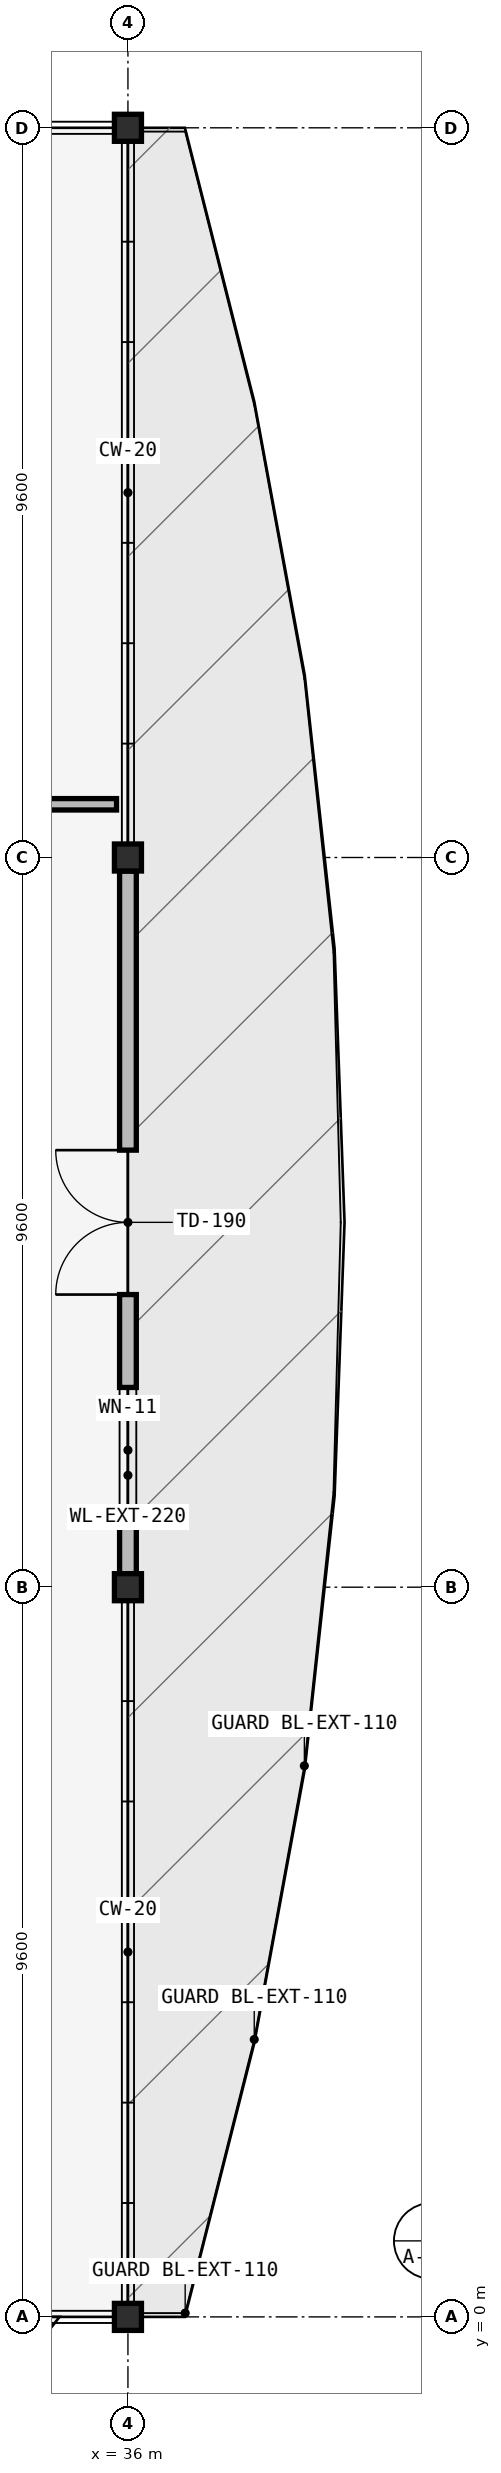
"""IFC4 building model, lengths in metres.
Left out: names, types, materials, properties, quantities, classifications, styles, units other than length and angle.
Written with IfcOpenShell. Run it as: python <this file> out.ifc"""

import sys

from ifc_helpers import new_model, si_unit, direction, frame, frame_2d, origin, origin_2d, place, context, subcontext, project, spatial, rectangle, hollow_circle, extrude, element, fill, save


model = new_model("IFC4")
c1 = context("Model", 3, precision=1e-05, world=origin(), true_north=direction((0.0, 1.0)))
c2 = subcontext(c1, "Body", "Model", "MODEL_VIEW")
j1 = project(units=[si_unit("LENGTHUNIT", "METRE"), si_unit("PLANEANGLEUNIT", "RADIAN")], contexts=[c1])
p1 = place(None, origin())
s1 = spatial("IfcSite", under=j1, at=p1, CompositionType="ELEMENT")
p2 = place(p1, origin())
s2 = spatial("IfcBuilding", under=s1, at=p2, CompositionType="ELEMENT")
p3 = place(p2, frame((0.0, 0.0, 5.4)))
s3 = spatial("IfcBuildingStorey", under=s2, at=p3, CompositionType="ELEMENT", Elevation=5.4)
for number, where, z_axis, x_axis in (
    (1, (36.0, 0.0, 0.0), (0.0, 0.0, 1.0), (1.0, 0.0, 0.0)),
    (2, (36.0, 9.6, 0.0), (0.0, 0.0, 1.0), (1.0, 0.0, 0.0)),
    (3, (36.0, 19.2, 0.0), (0.0, 0.0, 1.0), (1.0, 0.0, 0.0)),
    (4, (36.0, 28.8, 0.0), (0.0, 0.0, 1.0), (1.0, 0.0, 0.0)),
):
    element("IfcColumn", number, at=place(p3, frame(where, z_axis=z_axis, x_axis=x_axis)), inside=s3, PredefinedType="COLUMN", context=c2, shape_type="SweptSolid", body=[
        extrude(hollow_circle(Radius=0.178, WallThickness=0.013, at=origin_2d()), origin(), (0.0, 0.0, 1.0), 4.8),
    ])
p4 = place(p3, frame((36.0, 9.778, 0.0), z_axis=(0.0, 0.0, 1.0), x_axis=(0.0, 1.0, 0.0)))
e5 = element("IfcWall", 5, at=p4, inside=s3, PredefinedType="SOLIDWALL", context=c2, shape_type="SweptSolid", body=[
    extrude(rectangle(XDim=9.244, YDim=0.22, at=frame_2d((4.622, 0.0))), origin(), (0.0, 0.0, 1.0), 3.901),
])
p5 = place(p4, frame((3.672, 0.0, 0.0)))
e6 = element("IfcOpeningElement", 6, at=p5, cuts=e5, PredefinedType="OPENING", context=c2, shape_type="SweptSolid", body=[
    extrude(rectangle(XDim=1.9, YDim=2.25, at=frame_2d((0.95, 1.125))), frame((0.0, 0.125, 0.0), z_axis=(0.0, -1.0, 0.0), x_axis=(1.0, 0.0, 0.0)), (0.0, 0.0, 1.0), 0.25),
])
p6 = place(p4, frame((0.8, 0.0, 0.8)))
e7 = element("IfcOpeningElement", 7, at=p6, cuts=e5, PredefinedType="OPENING", context=c2, shape_type="SweptSolid", body=[
    extrude(rectangle(XDim=1.65, YDim=2.1, at=frame_2d((0.825, 1.05))), frame((0.0, 0.125, 0.0), z_axis=(0.0, -1.0, 0.0), x_axis=(1.0, 0.0, 0.0)), (0.0, 0.0, 1.0), 0.25),
])
p7 = place(p3, frame((10.2, 19.9, 0.0), z_axis=(0.0, 0.0, 1.0), x_axis=(1.0, 0.0, 0.0)))
e8 = element("IfcWall", 8, at=p7, inside=s3, PredefinedType="PARTITIONING", context=c2, shape_type="SweptSolid", body=[
    extrude(rectangle(XDim=25.65, YDim=0.15, at=frame_2d((12.825, 0.0))), origin(), (0.0, 0.0, 1.0), 4.52),
])
p8 = place(p7, frame((12.265, 0.0, 0.0)))
e9 = element("IfcOpeningElement", 9, at=p8, cuts=e8, PredefinedType="OPENING", context=c2, shape_type="SweptSolid", body=[
    extrude(rectangle(XDim=1.12, YDim=2.18, at=frame_2d((0.56, 1.09))), frame((0.0, 0.09, 0.0), z_axis=(0.0, -1.0, 0.0), x_axis=(1.0, 0.0, 0.0)), (0.0, 0.0, 1.0), 0.18),
])
p9 = place(p5, frame((1.9, 0.0, 0.0), z_axis=(0.0, 0.0, 1.0), x_axis=(-1.0, 0.0, 0.0)))
e10 = element("IfcDoor", 10, at=p9, inside=s3, OperationType="DOUBLE_DOOR_SINGLE_SWING", PredefinedType="DOOR", context=c2, shape_type="SweptSolid", body=[
    extrude(rectangle(XDim=1.9, YDim=2.25, at=frame_2d((0.95, 1.125))), frame((0.0, 0.025, 0.0), z_axis=(0.0, -1.0, 0.0), x_axis=(1.0, 0.0, 0.0)), (0.0, 0.0, 1.0), 0.05),
])
fill(e6, e10)
p10 = place(p6, origin())
e11 = element("IfcWindow", 11, at=p10, inside=s3, PartitioningType="SINGLE_PANEL", PredefinedType="WINDOW", context=c2, shape_type="SweptSolid", body=[
    extrude(rectangle(XDim=1.65, YDim=2.1, at=frame_2d((0.825, 1.05))), frame((0.0, 0.03, 0.0), z_axis=(0.0, -1.0, 0.0), x_axis=(1.0, 0.0, 0.0)), (0.0, 0.0, 1.0), 0.06),
])
fill(e7, e11)
save(model, sys.argv[1])
